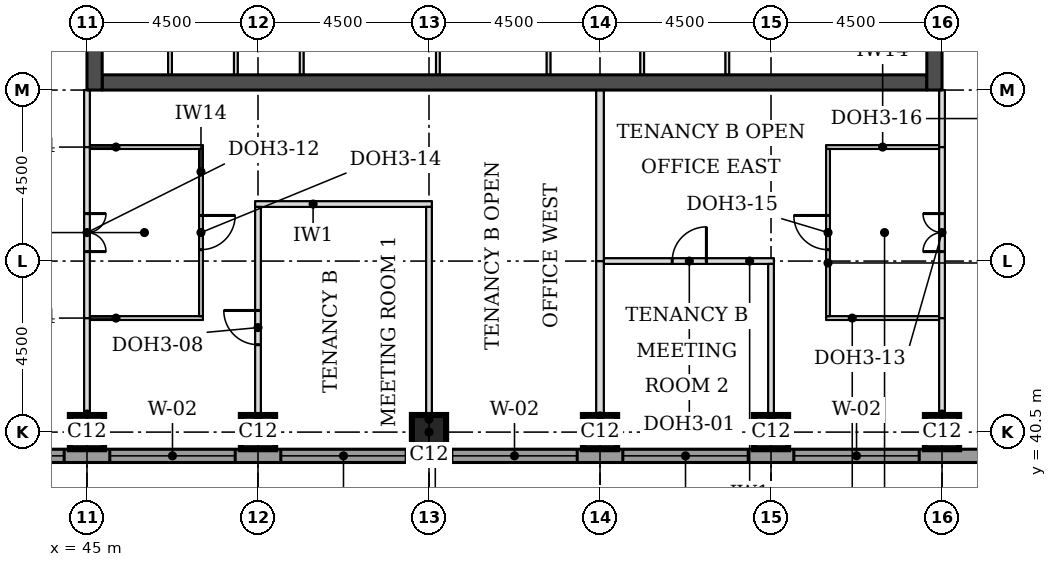
"""IFC4 building model, lengths in metres.
Left out: names, types, materials, properties, quantities, classifications, styles, units other than length and angle.
Written with IfcOpenShell. Run it as: python <this file> out.ifc"""

import sys

from ifc_helpers import new_model, si_unit, direction, frame, frame_2d, origin, origin_2d, place, context, subcontext, project, spatial, rectangle, extrude, element, fill, save


model = new_model("IFC4")
c1 = context("Model", 3, precision=1e-05, world=origin(), true_north=direction((0.0, 1.0)))
c2 = subcontext(c1, "Body", "Model", "MODEL_VIEW")
j1 = project(units=[si_unit("LENGTHUNIT", "METRE"), si_unit("PLANEANGLEUNIT", "RADIAN")], contexts=[c1])
p1 = place(None, origin())
s1 = spatial("IfcSite", under=j1, at=p1, CompositionType="ELEMENT")
p2 = place(p1, origin())
s2 = spatial("IfcBuilding", under=s1, at=p2, CompositionType="ELEMENT")
p3 = place(p2, frame((0.0, 0.0, 166.2)))
s3 = spatial("IfcBuildingStorey", under=s2, at=p3, CompositionType="ELEMENT", Elevation=166.2)
for number, where, z_axis, x_axis in (
    (1, (45.0, 40.5, 0.0), (0.0, 0.0, 1.0), (1.0, 0.0, 0.0)),
    (2, (49.5, 40.5, 0.0), (0.0, 0.0, 1.0), (1.0, 0.0, 0.0)),
    (3, (54.0, 40.5, 0.0), (0.0, 0.0, 1.0), (1.0, 0.0, 0.0)),
    (4, (58.5, 40.5, 0.0), (0.0, 0.0, 1.0), (1.0, 0.0, 0.0)),
    (5, (63.0, 40.5, 0.0), (0.0, 0.0, 1.0), (1.0, 0.0, 0.0)),
    (6, (67.5, 40.5, 0.0), (0.0, 0.0, 1.0), (1.0, 0.0, 0.0)),
):
    element("IfcColumn", number, at=place(p3, frame(where, z_axis=z_axis, x_axis=x_axis)), inside=s3, PredefinedType="COLUMN", context=c2, shape_type="SweptSolid", body=[
        extrude(rectangle(XDim=0.9, YDim=0.9, at=origin_2d()), origin(), (0.0, 0.0, 1.0), 3.7),
    ])
p4 = place(p3, frame((45.4, 49.7, 0.0), z_axis=(0.0, 0.0, 1.0), x_axis=(1.0, 0.0, 0.0)))
e7 = element("IfcWall", 7, at=p4, inside=s3, PredefinedType="SHEAR", context=c2, shape_type="SweptSolid", body=[
    extrude(rectangle(XDim=21.7, YDim=0.4, at=frame_2d((10.85, 0.0))), origin(), (0.0, 0.0, 1.0), 3.7),
])
p5 = place(p3, frame((45.2, 49.5, 0.0), z_axis=(0.0, 0.0, 1.0), x_axis=(0.0, 1.0, 0.0)))
e8 = element("IfcWall", 8, at=p5, inside=s3, PredefinedType="SHEAR", context=c2, shape_type="SweptSolid", body=[
    extrude(rectangle(XDim=22.5, YDim=0.4, at=frame_2d((11.25, 0.0))), origin(), (0.0, 0.0, 1.0), 3.7),
])
p6 = place(p5, frame((4.2, 0.0, 0.0)))
e9 = element("IfcOpeningElement", 9, at=p6, cuts=e8, PredefinedType="OPENING", context=c2, shape_type="SweptSolid", body=[
    extrude(rectangle(XDim=1.8, YDim=2.1, at=frame_2d((0.9, 1.05))), frame((0.0, 0.21, 0.0), z_axis=(0.0, -1.0, 0.0), x_axis=(1.0, 0.0, 0.0)), (0.0, 0.0, 1.0), 0.42),
])
p7 = place(p5, frame((6.9, 0.0, 0.0)))
e10 = element("IfcOpeningElement", 10, at=p7, cuts=e8, PredefinedType="OPENING", context=c2, shape_type="SweptSolid", body=[
    extrude(rectangle(XDim=1.1, YDim=2.1, at=frame_2d((0.55, 1.05))), frame((0.0, 0.21, 0.0), z_axis=(0.0, -1.0, 0.0), x_axis=(1.0, 0.0, 0.0)), (0.0, 0.0, 1.0), 0.42),
])
p8 = place(p5, frame((13.6, 0.0, 0.0)))
e11 = element("IfcOpeningElement", 11, at=p8, cuts=e8, PredefinedType="OPENING", context=c2, shape_type="SweptSolid", body=[
    extrude(rectangle(XDim=1.1, YDim=2.1, at=frame_2d((0.55, 1.05))), frame((0.0, 0.21, 0.0), z_axis=(0.0, -1.0, 0.0), x_axis=(1.0, 0.0, 0.0)), (0.0, 0.0, 1.0), 0.42),
])
p9 = place(p5, frame((16.5, 0.0, 0.0)))
e12 = element("IfcOpeningElement", 12, at=p9, cuts=e8, PredefinedType="OPENING", context=c2, shape_type="SweptSolid", body=[
    extrude(rectangle(XDim=1.8, YDim=2.1, at=frame_2d((0.9, 1.05))), frame((0.0, 0.21, 0.0), z_axis=(0.0, -1.0, 0.0), x_axis=(1.0, 0.0, 0.0)), (0.0, 0.0, 1.0), 0.42),
])
p10 = place(p3, frame((67.3, 49.5, 0.0), z_axis=(0.0, 0.0, 1.0), x_axis=(0.0, 1.0, 0.0)))
e13 = element("IfcWall", 13, at=p10, inside=s3, PredefinedType="SHEAR", context=c2, shape_type="SweptSolid", body=[
    extrude(rectangle(XDim=22.5, YDim=0.4, at=frame_2d((11.25, 0.0))), origin(), (0.0, 0.0, 1.0), 3.7),
])
p11 = place(p10, frame((4.2, 0.0, 0.0)))
e14 = element("IfcOpeningElement", 14, at=p11, cuts=e13, PredefinedType="OPENING", context=c2, shape_type="SweptSolid", body=[
    extrude(rectangle(XDim=1.8, YDim=2.1, at=frame_2d((0.9, 1.05))), frame((0.0, 0.21, 0.0), z_axis=(0.0, -1.0, 0.0), x_axis=(1.0, 0.0, 0.0)), (0.0, 0.0, 1.0), 0.42),
])
p12 = place(p10, frame((6.9, 0.0, 0.0)))
e15 = element("IfcOpeningElement", 15, at=p12, cuts=e13, PredefinedType="OPENING", context=c2, shape_type="SweptSolid", body=[
    extrude(rectangle(XDim=1.1, YDim=2.1, at=frame_2d((0.55, 1.05))), frame((0.0, 0.21, 0.0), z_axis=(0.0, -1.0, 0.0), x_axis=(1.0, 0.0, 0.0)), (0.0, 0.0, 1.0), 0.42),
])
p13 = place(p10, frame((13.6, 0.0, 0.0)))
e16 = element("IfcOpeningElement", 16, at=p13, cuts=e13, PredefinedType="OPENING", context=c2, shape_type="SweptSolid", body=[
    extrude(rectangle(XDim=1.1, YDim=2.1, at=frame_2d((0.55, 1.05))), frame((0.0, 0.21, 0.0), z_axis=(0.0, -1.0, 0.0), x_axis=(1.0, 0.0, 0.0)), (0.0, 0.0, 1.0), 0.42),
])
p14 = place(p10, frame((16.5, 0.0, 0.0)))
e17 = element("IfcOpeningElement", 17, at=p14, cuts=e13, PredefinedType="OPENING", context=c2, shape_type="SweptSolid", body=[
    extrude(rectangle(XDim=1.8, YDim=2.1, at=frame_2d((0.9, 1.05))), frame((0.0, 0.21, 0.0), z_axis=(0.0, -1.0, 0.0), x_axis=(1.0, 0.0, 0.0)), (0.0, 0.0, 1.0), 0.42),
])
p15 = place(p3, frame((36.0, 39.875, 0.0), z_axis=(0.0, 0.0, 1.0), x_axis=(1.0, 0.0, 0.0)))
e18 = element("IfcWall", 18, at=p15, inside=s3, PredefinedType="STANDARD", context=c2, shape_type="SweptSolid", body=[
    extrude(rectangle(XDim=36.331, YDim=0.35, at=frame_2d((18.166, 0.0))), origin(), (0.0, 0.0, 1.0), 3.525),
])
p16 = place(p15, frame((5.1, 0.0, 0.9)))
e19 = element("IfcOpeningElement", 19, at=p16, cuts=e18, PredefinedType="OPENING", context=c2, shape_type="SweptSolid", body=[
    extrude(rectangle(XDim=3.3, YDim=1.9, at=frame_2d((1.65, 0.95))), frame((0.0, 0.185, 0.0), z_axis=(0.0, -1.0, 0.0), x_axis=(1.0, 0.0, 0.0)), (0.0, 0.0, 1.0), 0.37),
])
p17 = place(p15, frame((9.6, 0.0, 0.9)))
e20 = element("IfcOpeningElement", 20, at=p17, cuts=e18, PredefinedType="OPENING", context=c2, shape_type="SweptSolid", body=[
    extrude(rectangle(XDim=3.3, YDim=1.9, at=frame_2d((1.65, 0.95))), frame((0.0, 0.185, 0.0), z_axis=(0.0, -1.0, 0.0), x_axis=(1.0, 0.0, 0.0)), (0.0, 0.0, 1.0), 0.37),
])
p18 = place(p15, frame((14.1, 0.0, 0.9)))
e21 = element("IfcOpeningElement", 21, at=p18, cuts=e18, PredefinedType="OPENING", context=c2, shape_type="SweptSolid", body=[
    extrude(rectangle(XDim=3.3, YDim=1.9, at=frame_2d((1.65, 0.95))), frame((0.0, 0.185, 0.0), z_axis=(0.0, -1.0, 0.0), x_axis=(1.0, 0.0, 0.0)), (0.0, 0.0, 1.0), 0.37),
])
p19 = place(p15, frame((18.6, 0.0, 0.9)))
e22 = element("IfcOpeningElement", 22, at=p19, cuts=e18, PredefinedType="OPENING", context=c2, shape_type="SweptSolid", body=[
    extrude(rectangle(XDim=3.3, YDim=1.9, at=frame_2d((1.65, 0.95))), frame((0.0, 0.185, 0.0), z_axis=(0.0, -1.0, 0.0), x_axis=(1.0, 0.0, 0.0)), (0.0, 0.0, 1.0), 0.37),
])
p20 = place(p15, frame((23.1, 0.0, 0.9)))
e23 = element("IfcOpeningElement", 23, at=p20, cuts=e18, PredefinedType="OPENING", context=c2, shape_type="SweptSolid", body=[
    extrude(rectangle(XDim=3.3, YDim=1.9, at=frame_2d((1.65, 0.95))), frame((0.0, 0.185, 0.0), z_axis=(0.0, -1.0, 0.0), x_axis=(1.0, 0.0, 0.0)), (0.0, 0.0, 1.0), 0.37),
])
p21 = place(p15, frame((27.6, 0.0, 0.9)))
e24 = element("IfcOpeningElement", 24, at=p21, cuts=e18, PredefinedType="OPENING", context=c2, shape_type="SweptSolid", body=[
    extrude(rectangle(XDim=3.3, YDim=1.9, at=frame_2d((1.65, 0.95))), frame((0.0, 0.185, 0.0), z_axis=(0.0, -1.0, 0.0), x_axis=(1.0, 0.0, 0.0)), (0.0, 0.0, 1.0), 0.37),
])
for number, where, z_axis, x_axis in (
    (25, (45.075, 43.5, 0.0), (0.0, 0.0, 1.0), (1.0, 0.0, 0.0)),
    (26, (64.45, 43.5, 0.0), (0.0, 0.0, 1.0), (1.0, 0.0, 0.0)),
):
    element("IfcWall", number, at=place(p3, frame(where, z_axis=z_axis, x_axis=x_axis)), inside=s3, PredefinedType="PARTITIONING", context=c2, shape_type="SweptSolid", body=[
        extrude(rectangle(XDim=2.975, YDim=0.1, at=frame_2d((1.488, 0.0))), origin(), (0.0, 0.0, 1.0), 3.55),
    ])
p22 = place(p3, frame((58.6, 45.0, 0.0), z_axis=(0.0, 0.0, 1.0), x_axis=(1.0, 0.0, 0.0)))
e27 = element("IfcWall", 27, at=p22, inside=s3, PredefinedType="PARTITIONING", context=c2, shape_type="SweptSolid", body=[
    extrude(rectangle(XDim=4.475, YDim=0.15, at=frame_2d((2.237, 0.0))), origin(), (0.0, 0.0, 1.0), 3.55),
])
p23 = place(p22, frame((1.8, 0.0, 0.0)))
e28 = element("IfcOpeningElement", 28, at=p23, cuts=e27, PredefinedType="OPENING", context=c2, shape_type="SweptSolid", body=[
    extrude(rectangle(XDim=0.9, YDim=2.1, at=frame_2d((0.45, 1.05))), frame((0.0, 0.085, 0.0), z_axis=(0.0, -1.0, 0.0), x_axis=(1.0, 0.0, 0.0)), (0.0, 0.0, 1.0), 0.17),
])
p24 = place(p3, frame((49.425, 46.5, 0.0), z_axis=(0.0, 0.0, 1.0), x_axis=(1.0, 0.0, 0.0)))
e29 = element("IfcWall", 29, at=p24, inside=s3, PredefinedType="PARTITIONING", context=c2, shape_type="SweptSolid", body=[
    extrude(rectangle(XDim=4.65, YDim=0.15, at=frame_2d((2.325, 0.0))), origin(), (0.0, 0.0, 1.0), 3.55),
])
for number, where, z_axis, x_axis in (
    (30, (45.075, 48.0, 0.0), (0.0, 0.0, 1.0), (1.0, 0.0, 0.0)),
    (31, (64.45, 48.0, 0.0), (0.0, 0.0, 1.0), (1.0, 0.0, 0.0)),
):
    element("IfcWall", number, at=place(p3, frame(where, z_axis=z_axis, x_axis=x_axis)), inside=s3, PredefinedType="PARTITIONING", context=c2, shape_type="SweptSolid", body=[
        extrude(rectangle(XDim=2.975, YDim=0.1, at=frame_2d((1.488, 0.0))), origin(), (0.0, 0.0, 1.0), 3.55),
    ])
p25 = place(p3, frame((45.0, 40.05, 0.0), z_axis=(0.0, 0.0, 1.0), x_axis=(0.0, 1.0, 0.0)))
e32 = element("IfcWall", 32, at=p25, inside=s3, PredefinedType="PARTITIONING", context=c2, shape_type="SweptSolid", body=[
    extrude(rectangle(XDim=3.45, YDim=0.15, at=frame_2d((1.725, 0.0))), origin(), (0.0, 0.0, 1.0), 3.022),
])
p26 = place(p3, frame((49.5, 40.05, 0.0), z_axis=(0.0, 0.0, 1.0), x_axis=(0.0, 1.0, 0.0)))
e33 = element("IfcWall", 33, at=p26, inside=s3, PredefinedType="PARTITIONING", context=c2, shape_type="SweptSolid", body=[
    extrude(rectangle(XDim=6.375, YDim=0.15, at=frame_2d((3.188, 0.0))), origin(), (0.0, 0.0, 1.0), 3.55),
])
p27 = place(p26, frame((2.75, 0.0, 0.0)))
e34 = element("IfcOpeningElement", 34, at=p27, cuts=e33, PredefinedType="OPENING", context=c2, shape_type="SweptSolid", body=[
    extrude(rectangle(XDim=0.9, YDim=2.1, at=frame_2d((0.45, 1.05))), frame((0.0, 0.085, 0.0), z_axis=(0.0, -1.0, 0.0), x_axis=(1.0, 0.0, 0.0)), (0.0, 0.0, 1.0), 0.17),
])
p28 = place(p3, frame((54.0, 40.05, 0.0), z_axis=(0.0, 0.0, 1.0), x_axis=(0.0, 1.0, 0.0)))
e35 = element("IfcWall", 35, at=p28, inside=s3, PredefinedType="PARTITIONING", context=c2, shape_type="SweptSolid", body=[
    extrude(rectangle(XDim=6.375, YDim=0.15, at=frame_2d((3.188, 0.0))), origin(), (0.0, 0.0, 1.0), 3.55),
])
p29 = place(p3, frame((58.5, 40.05, 0.0), z_axis=(0.0, 0.0, 1.0), x_axis=(0.0, 1.0, 0.0)))
e36 = element("IfcWall", 36, at=p29, inside=s3, PredefinedType="PARTITIONING", context=c2, shape_type="SweptSolid", body=[
    extrude(rectangle(XDim=4.95, YDim=0.2, at=frame_2d((2.475, 0.0))), origin(), (0.0, 0.0, 1.0), 3.55),
])
p30 = place(p3, frame((63.0, 40.05, 0.0), z_axis=(0.0, 0.0, 1.0), x_axis=(0.0, 1.0, 0.0)))
e37 = element("IfcWall", 37, at=p30, inside=s3, PredefinedType="PARTITIONING", context=c2, shape_type="SweptSolid", body=[
    extrude(rectangle(XDim=4.875, YDim=0.15, at=frame_2d((2.438, 0.0))), origin(), (0.0, 0.0, 1.0), 3.55),
])
p31 = place(p3, frame((67.5, 40.05, 0.0), z_axis=(0.0, 0.0, 1.0), x_axis=(0.0, 1.0, 0.0)))
e38 = element("IfcWall", 38, at=p31, inside=s3, PredefinedType="PARTITIONING", context=c2, shape_type="SweptSolid", body=[
    extrude(rectangle(XDim=3.45, YDim=0.15, at=frame_2d((1.725, 0.0))), origin(), (0.0, 0.0, 1.0), 3.022),
])
p32 = place(p3, frame((45.0, 43.5, 0.0), z_axis=(0.0, 0.0, 1.0), x_axis=(0.0, 1.0, 0.0)))
e39 = element("IfcWall", 39, at=p32, inside=s3, PredefinedType="PARTITIONING", context=c2, shape_type="SweptSolid", body=[
    extrude(rectangle(XDim=4.5, YDim=0.15, at=frame_2d((2.25, 0.0))), origin(), (0.0, 0.0, 1.0), 3.022),
])
p33 = place(p32, frame((1.75, 0.0, 0.0)))
e40 = element("IfcOpeningElement", 40, at=p33, cuts=e39, PredefinedType="OPENING", context=c2, shape_type="SweptSolid", body=[
    extrude(rectangle(XDim=1.0, YDim=2.1, at=frame_2d((0.5, 1.05))), frame((0.0, 0.085, 0.0), z_axis=(0.0, -1.0, 0.0), x_axis=(1.0, 0.0, 0.0)), (0.0, 0.0, 1.0), 0.17),
])
p34 = place(p3, frame((67.5, 43.5, 0.0), z_axis=(0.0, 0.0, 1.0), x_axis=(0.0, 1.0, 0.0)))
e41 = element("IfcWall", 41, at=p34, inside=s3, PredefinedType="PARTITIONING", context=c2, shape_type="SweptSolid", body=[
    extrude(rectangle(XDim=4.5, YDim=0.15, at=frame_2d((2.25, 0.0))), origin(), (0.0, 0.0, 1.0), 3.022),
])
p35 = place(p34, frame((1.75, 0.0, 0.0)))
e42 = element("IfcOpeningElement", 42, at=p35, cuts=e41, PredefinedType="OPENING", context=c2, shape_type="SweptSolid", body=[
    extrude(rectangle(XDim=1.0, YDim=2.1, at=frame_2d((0.5, 1.05))), frame((0.0, 0.085, 0.0), z_axis=(0.0, -1.0, 0.0), x_axis=(1.0, 0.0, 0.0)), (0.0, 0.0, 1.0), 0.17),
])
p36 = place(p3, frame((48.0, 43.55, 0.0), z_axis=(0.0, 0.0, 1.0), x_axis=(0.0, 1.0, 0.0)))
e43 = element("IfcWall", 43, at=p36, inside=s3, PredefinedType="PARTITIONING", context=c2, shape_type="SweptSolid", body=[
    extrude(rectangle(XDim=4.4, YDim=0.1, at=frame_2d((2.2, 0.0))), origin(), (0.0, 0.0, 1.0), 3.55),
])
p37 = place(p36, frame((1.75, 0.0, 0.0)))
e44 = element("IfcOpeningElement", 44, at=p37, cuts=e43, PredefinedType="OPENING", context=c2, shape_type="SweptSolid", body=[
    extrude(rectangle(XDim=0.9, YDim=2.1, at=frame_2d((0.45, 1.05))), frame((0.0, 0.06, 0.0), z_axis=(0.0, -1.0, 0.0), x_axis=(1.0, 0.0, 0.0)), (0.0, 0.0, 1.0), 0.12),
])
p38 = place(p3, frame((64.5, 43.55, 0.0), z_axis=(0.0, 0.0, 1.0), x_axis=(0.0, 1.0, 0.0)))
e45 = element("IfcWall", 45, at=p38, inside=s3, PredefinedType="PARTITIONING", context=c2, shape_type="SweptSolid", body=[
    extrude(rectangle(XDim=4.4, YDim=0.1, at=frame_2d((2.2, 0.0))), origin(), (0.0, 0.0, 1.0), 3.55),
])
p39 = place(p38, frame((1.75, 0.0, 0.0)))
e46 = element("IfcOpeningElement", 46, at=p39, cuts=e45, PredefinedType="OPENING", context=c2, shape_type="SweptSolid", body=[
    extrude(rectangle(XDim=0.9, YDim=2.1, at=frame_2d((0.45, 1.05))), frame((0.0, 0.06, 0.0), z_axis=(0.0, -1.0, 0.0), x_axis=(1.0, 0.0, 0.0)), (0.0, 0.0, 1.0), 0.12),
])
p40 = place(p3, frame((58.5, 45.0, 0.0), z_axis=(0.0, 0.0, 1.0), x_axis=(0.0, 1.0, 0.0)))
e47 = element("IfcWall", 47, at=p40, inside=s3, PredefinedType="PARTITIONING", context=c2, shape_type="SweptSolid", body=[
    extrude(rectangle(XDim=4.5, YDim=0.2, at=frame_2d((2.25, 0.0))), origin(), (0.0, 0.0, 1.0), 3.55),
])
for number, where, z_axis, x_axis in (
    (48, (45.0, 48.0, 0.0), (0.0, 0.0, 1.0), (0.0, 1.0, 0.0)),
    (49, (67.5, 48.0, 0.0), (0.0, 0.0, 1.0), (0.0, 1.0, 0.0)),
):
    element("IfcWall", number, at=place(p3, frame(where, z_axis=z_axis, x_axis=x_axis)), inside=s3, PredefinedType="PARTITIONING", context=c2, shape_type="SweptSolid", body=[
        extrude(rectangle(XDim=1.5, YDim=0.15, at=frame_2d((0.75, 0.0))), origin(), (0.0, 0.0, 1.0), 3.022),
    ])
for number, where, z_axis, x_axis in (
    (50, (47.185, 49.9, 0.0), (0.0, 0.0, 1.0), (0.0, 1.0, 0.0)),
    (51, (48.917, 49.9, 0.0), (0.0, 0.0, 1.0), (0.0, 1.0, 0.0)),
    (52, (50.65, 49.9, 0.0), (0.0, 0.0, 1.0), (0.0, 1.0, 0.0)),
    (53, (54.234, 49.9, 0.0), (0.0, 0.0, 1.0), (0.0, 1.0, 0.0)),
    (54, (57.146, 49.9, 0.0), (0.0, 0.0, 1.0), (0.0, 1.0, 0.0)),
    (55, (59.61, 49.9, 0.0), (0.0, 0.0, 1.0), (0.0, 1.0, 0.0)),
    (56, (61.85, 49.9, 0.0), (0.0, 0.0, 1.0), (0.0, 1.0, 0.0)),
):
    element("IfcWall", number, at=place(p3, frame(where, z_axis=z_axis, x_axis=x_axis)), inside=s3, PredefinedType="PARTITIONING", context=c2, shape_type="SweptSolid", body=[
        extrude(rectangle(XDim=3.1, YDim=0.1, at=frame_2d((1.55, 0.0))), origin(), (0.0, 0.0, 1.0), 3.55),
    ])
p41 = place(p16, origin())
e57 = element("IfcWindow", 57, at=p41, inside=s3, PartitioningType="SINGLE_PANEL", PredefinedType="WINDOW", context=c2, shape_type="SweptSolid", body=[
    extrude(rectangle(XDim=3.3, YDim=1.9, at=frame_2d((1.65, 0.95))), frame((0.0, 0.085, 0.0), z_axis=(0.0, -1.0, 0.0), x_axis=(1.0, 0.0, 0.0)), (0.0, 0.0, 1.0), 0.06),
])
fill(e19, e57)
p42 = place(p17, origin())
e58 = element("IfcWindow", 58, at=p42, inside=s3, PartitioningType="SINGLE_PANEL", PredefinedType="WINDOW", context=c2, shape_type="SweptSolid", body=[
    extrude(rectangle(XDim=3.3, YDim=1.9, at=frame_2d((1.65, 0.95))), frame((0.0, 0.085, 0.0), z_axis=(0.0, -1.0, 0.0), x_axis=(1.0, 0.0, 0.0)), (0.0, 0.0, 1.0), 0.06),
])
fill(e20, e58)
p43 = place(p18, origin())
e59 = element("IfcWindow", 59, at=p43, inside=s3, PartitioningType="SINGLE_PANEL", PredefinedType="WINDOW", context=c2, shape_type="SweptSolid", body=[
    extrude(rectangle(XDim=3.3, YDim=1.9, at=frame_2d((1.65, 0.95))), frame((0.0, 0.085, 0.0), z_axis=(0.0, -1.0, 0.0), x_axis=(1.0, 0.0, 0.0)), (0.0, 0.0, 1.0), 0.06),
])
fill(e21, e59)
p44 = place(p19, origin())
e60 = element("IfcWindow", 60, at=p44, inside=s3, PartitioningType="SINGLE_PANEL", PredefinedType="WINDOW", context=c2, shape_type="SweptSolid", body=[
    extrude(rectangle(XDim=3.3, YDim=1.9, at=frame_2d((1.65, 0.95))), frame((0.0, 0.085, 0.0), z_axis=(0.0, -1.0, 0.0), x_axis=(1.0, 0.0, 0.0)), (0.0, 0.0, 1.0), 0.06),
])
fill(e22, e60)
p45 = place(p20, origin())
e61 = element("IfcWindow", 61, at=p45, inside=s3, PartitioningType="SINGLE_PANEL", PredefinedType="WINDOW", context=c2, shape_type="SweptSolid", body=[
    extrude(rectangle(XDim=3.3, YDim=1.9, at=frame_2d((1.65, 0.95))), frame((0.0, 0.085, 0.0), z_axis=(0.0, -1.0, 0.0), x_axis=(1.0, 0.0, 0.0)), (0.0, 0.0, 1.0), 0.06),
])
fill(e23, e61)
p46 = place(p21, origin())
e62 = element("IfcWindow", 62, at=p46, inside=s3, PartitioningType="SINGLE_PANEL", PredefinedType="WINDOW", context=c2, shape_type="SweptSolid", body=[
    extrude(rectangle(XDim=3.3, YDim=1.9, at=frame_2d((1.65, 0.95))), frame((0.0, 0.085, 0.0), z_axis=(0.0, -1.0, 0.0), x_axis=(1.0, 0.0, 0.0)), (0.0, 0.0, 1.0), 0.06),
])
fill(e24, e62)
p47 = place(p33, frame((1.0, 0.0, 0.0), z_axis=(0.0, 0.0, 1.0), x_axis=(-1.0, 0.0, 0.0)))
e63 = element("IfcDoor", 63, at=p47, inside=s3, OperationType="DOUBLE_DOOR_SINGLE_SWING", PredefinedType="DOOR", context=c2, shape_type="SweptSolid", body=[
    extrude(rectangle(XDim=1.0, YDim=2.1, at=frame_2d((0.5, 1.05))), frame((0.0, 0.025, 0.0), z_axis=(0.0, -1.0, 0.0), x_axis=(1.0, 0.0, 0.0)), (0.0, 0.0, 1.0), 0.05),
])
fill(e40, e63)
p48 = place(p37, frame((0.9, 0.0, 0.0), z_axis=(0.0, 0.0, 1.0), x_axis=(-1.0, 0.0, 0.0)))
e64 = element("IfcDoor", 64, at=p48, inside=s3, OperationType="SINGLE_SWING_LEFT", PredefinedType="DOOR", context=c2, shape_type="SweptSolid", body=[
    extrude(rectangle(XDim=0.9, YDim=2.1, at=frame_2d((0.45, 1.05))), frame((0.0, 0.025, 0.0), z_axis=(0.0, -1.0, 0.0), x_axis=(1.0, 0.0, 0.0)), (0.0, 0.0, 1.0), 0.05),
])
fill(e44, e64)
p49 = place(p27, origin())
e65 = element("IfcDoor", 65, at=p49, inside=s3, OperationType="SINGLE_SWING_RIGHT", PredefinedType="DOOR", context=c2, shape_type="SweptSolid", body=[
    extrude(rectangle(XDim=0.9, YDim=2.1, at=frame_2d((0.45, 1.05))), frame((0.0, 0.025, 0.0), z_axis=(0.0, -1.0, 0.0), x_axis=(1.0, 0.0, 0.0)), (0.0, 0.0, 1.0), 0.05),
])
fill(e34, e65)
p50 = place(p35, origin())
e66 = element("IfcDoor", 66, at=p50, inside=s3, OperationType="DOUBLE_DOOR_SINGLE_SWING", PredefinedType="DOOR", context=c2, shape_type="SweptSolid", body=[
    extrude(rectangle(XDim=1.0, YDim=2.1, at=frame_2d((0.5, 1.05))), frame((0.0, 0.025, 0.0), z_axis=(0.0, -1.0, 0.0), x_axis=(1.0, 0.0, 0.0)), (0.0, 0.0, 1.0), 0.05),
])
fill(e42, e66)
p51 = place(p39, origin())
e67 = element("IfcDoor", 67, at=p51, inside=s3, OperationType="SINGLE_SWING_RIGHT", PredefinedType="DOOR", context=c2, shape_type="SweptSolid", body=[
    extrude(rectangle(XDim=0.9, YDim=2.1, at=frame_2d((0.45, 1.05))), frame((0.0, 0.025, 0.0), z_axis=(0.0, -1.0, 0.0), x_axis=(1.0, 0.0, 0.0)), (0.0, 0.0, 1.0), 0.05),
])
fill(e46, e67)
p52 = place(p23, origin())
e68 = element("IfcDoor", 68, at=p52, inside=s3, OperationType="SINGLE_SWING_RIGHT", PredefinedType="DOOR", context=c2, shape_type="SweptSolid", body=[
    extrude(rectangle(XDim=0.9, YDim=2.1, at=frame_2d((0.45, 1.05))), frame((0.0, 0.025, 0.0), z_axis=(0.0, -1.0, 0.0), x_axis=(1.0, 0.0, 0.0)), (0.0, 0.0, 1.0), 0.05),
])
fill(e28, e68)
save(model, sys.argv[1])
